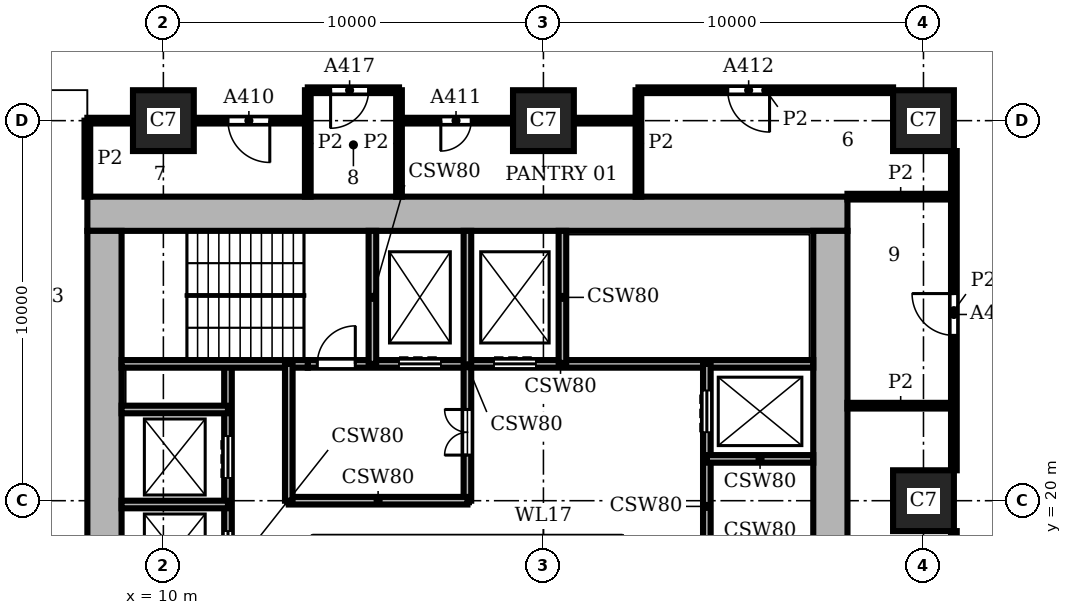
"""IFC4 building model, lengths in metres.
Left out: names, types, materials, properties, quantities, classifications, styles, units other than length and angle.
Written with IfcOpenShell. Run it as: python <this file> out.ifc"""

import sys

from ifc_helpers import new_model, si_unit, direction, frame, frame_2d, origin, origin_2d, place, context, subcontext, project, spatial, rectangle, extrude, element, fill, save


model = new_model("IFC4")
c1 = context("Model", 3, precision=1e-05, world=origin(), true_north=direction((0.0, 1.0)))
c2 = subcontext(c1, "Body", "Model", "MODEL_VIEW")
j1 = project(units=[si_unit("LENGTHUNIT", "METRE"), si_unit("PLANEANGLEUNIT", "RADIAN")], contexts=[c1])
p1 = place(None, origin())
s1 = spatial("IfcSite", under=j1, at=p1, CompositionType="ELEMENT")
p2 = place(p1, origin())
s2 = spatial("IfcBuilding", under=s1, at=p2, CompositionType="ELEMENT")
p3 = place(p2, frame((0.0, 0.0, 47.1)))
s3 = spatial("IfcBuildingStorey", under=s2, at=p3, CompositionType="ELEMENT", Elevation=47.1)
for number, where, z_axis, x_axis in (
    (1, (10.0, 30.0, 0.0), (0.0, 0.0, 1.0), (1.0, 0.0, 0.0)),
    (2, (20.0, 30.0, 0.0), (0.0, 0.0, 1.0), (1.0, 0.0, 0.0)),
    (3, (30.0, 20.0, 0.0), (0.0, 0.0, 1.0), (1.0, 0.0, 0.0)),
    (4, (30.0, 30.0, 0.0), (0.0, 0.0, 1.0), (1.0, 0.0, 0.0)),
):
    element("IfcColumn", number, at=place(p3, frame(where, z_axis=z_axis, x_axis=x_axis)), inside=s3, PredefinedType="COLUMN", context=c2, shape_type="SweptSolid", body=[
        extrude(rectangle(XDim=1.6, YDim=1.6, at=origin_2d()), origin(), (0.0, 0.0, 1.0), 3.9),
    ])
p4 = place(p3, frame((27.55, 8.9, 0.0), z_axis=(0.0, 0.0, 1.0), x_axis=(0.0, 1.0, 0.0)))
e5 = element("IfcWall", 5, at=p4, inside=s3, PredefinedType="SHEAR", context=c2, shape_type="SweptSolid", body=[
    extrude(rectangle(XDim=18.2, YDim=0.9, at=frame_2d((9.1, 0.0))), origin(), (0.0, 0.0, 1.0), 3.9),
])
p5 = place(p4, frame((4.55, 0.0, 0.0)))
e6 = element("IfcOpeningElement", 6, at=p5, cuts=e5, PredefinedType="OPENING", context=c2, shape_type="SweptSolid", body=[
    extrude(rectangle(XDim=1.6, YDim=2.1, at=frame_2d((0.8, 1.05))), frame((0.0, 0.46, 0.0), z_axis=(0.0, -1.0, 0.0), x_axis=(1.0, 0.0, 0.0)), (0.0, 0.0, 1.0), 0.92),
])
p6 = place(p3, frame((28.0, 27.55, 0.0), z_axis=(0.0, 0.0, 1.0), x_axis=(-1.0, 0.0, 0.0)))
e7 = element("IfcWall", 7, at=p6, inside=s3, PredefinedType="SHEAR", context=c2, shape_type="SweptSolid", body=[
    extrude(rectangle(XDim=20.0, YDim=0.9, at=frame_2d((10.0, 0.0))), origin(), (0.0, 0.0, 1.0), 3.9),
])
p7 = place(p3, frame((8.45, 27.1, 0.0), z_axis=(0.0, 0.0, 1.0), x_axis=(0.0, -1.0, 0.0)))
e8 = element("IfcWall", 8, at=p7, inside=s3, PredefinedType="SHEAR", context=c2, shape_type="SweptSolid", body=[
    extrude(rectangle(XDim=18.2, YDim=0.9, at=frame_2d((9.1, 0.0))), origin(), (0.0, 0.0, 1.0), 3.9),
])
p8 = place(p3, frame((8.9, 19.9, 0.0), z_axis=(0.0, 0.0, 1.0), x_axis=(1.0, 0.0, 0.0)))
e9 = element("IfcWall", 9, at=p8, inside=s3, PredefinedType="SHEAR", context=c2, shape_type="SweptSolid", body=[
    extrude(rectangle(XDim=2.8, YDim=0.2, at=frame_2d((1.4, 0.0))), origin(), (0.0, 0.0, 1.0), 3.58),
])
p9 = place(p3, frame((13.3, 20.0, 0.0), z_axis=(0.0, 0.0, 1.0), x_axis=(1.0, 0.0, 0.0)))
e10 = element("IfcWall", 10, at=p9, inside=s3, PredefinedType="SHEAR", context=c2, shape_type="SweptSolid", body=[
    extrude(rectangle(XDim=4.7, YDim=0.2, at=frame_2d((2.35, 0.0))), origin(), (0.0, 0.0, 1.0), 3.58),
])
for number, where, z_axis, x_axis in (
    (11, (24.3, 21.1, 0.0), (0.0, 0.0, 1.0), (1.0, 0.0, 0.0)),
    (12, (8.9, 22.4, 0.0), (0.0, 0.0, 1.0), (1.0, 0.0, 0.0)),
):
    element("IfcWall", number, at=place(p3, frame(where, z_axis=z_axis, x_axis=x_axis)), inside=s3, PredefinedType="SHEAR", context=c2, shape_type="SweptSolid", body=[
        extrude(rectangle(XDim=2.8, YDim=0.2, at=frame_2d((1.4, 0.0))), origin(), (0.0, 0.0, 1.0), 3.58),
    ])
p10 = place(p3, frame((8.9, 23.6, 0.0), z_axis=(0.0, 0.0, 1.0), x_axis=(1.0, 0.0, 0.0)))
e13 = element("IfcWall", 13, at=p10, inside=s3, PredefinedType="SHEAR", context=c2, shape_type="SweptSolid", body=[
    extrude(rectangle(XDim=4.9, YDim=0.2, at=frame_2d((2.45, 0.0))), origin(), (0.0, 0.0, 1.0), 3.58),
])
p11 = place(p3, frame((13.8, 23.6, 0.0), z_axis=(0.0, 0.0, 1.0), x_axis=(1.0, 0.0, 0.0)))
e14 = element("IfcWall", 14, at=p11, inside=s3, PredefinedType="SHEAR", context=c2, shape_type="SweptSolid", body=[
    extrude(rectangle(XDim=13.3, YDim=0.2, at=frame_2d((6.65, 0.0))), origin(), (0.0, 0.0, 1.0), 3.58),
])
p12 = place(p11, frame((2.4, 0.0, 0.0)))
e15 = element("IfcOpeningElement", 15, at=p12, cuts=e14, PredefinedType="OPENING", context=c2, shape_type="SweptSolid", body=[
    extrude(rectangle(XDim=1.1, YDim=2.1, at=frame_2d((0.55, 1.05))), frame((0.0, 0.11, 0.0), z_axis=(0.0, -1.0, 0.0), x_axis=(1.0, 0.0, 0.0)), (0.0, 0.0, 1.0), 0.22),
])
p13 = place(p11, frame((4.9, 0.0, 0.0)))
e16 = element("IfcOpeningElement", 16, at=p13, cuts=e14, PredefinedType="OPENING", context=c2, shape_type="SweptSolid", body=[
    extrude(rectangle(XDim=1.1, YDim=2.1, at=frame_2d((0.55, 1.05))), frame((0.0, 0.11, 0.0), z_axis=(0.0, -1.0, 0.0), x_axis=(1.0, 0.0, 0.0)), (0.0, 0.0, 1.0), 0.22),
])
p14 = place(p11, frame((0.25, 0.0, 0.0)))
e17 = element("IfcOpeningElement", 17, at=p14, cuts=e14, PredefinedType="OPENING", context=c2, shape_type="SweptSolid", body=[
    extrude(rectangle(XDim=1.0, YDim=2.1, at=frame_2d((0.5, 1.05))), frame((0.0, 0.11, 0.0), z_axis=(0.0, -1.0, 0.0), x_axis=(1.0, 0.0, 0.0)), (0.0, 0.0, 1.0), 0.22),
])
p15 = place(p3, frame((11.7, 12.4, 0.0), z_axis=(0.0, 0.0, 1.0), x_axis=(0.0, 1.0, 0.0)))
e18 = element("IfcWall", 18, at=p15, inside=s3, PredefinedType="SHEAR", context=c2, shape_type="SweptSolid", body=[
    extrude(rectangle(XDim=11.2, YDim=0.2, at=frame_2d((5.6, 0.0))), origin(), (0.0, 0.0, 1.0), 3.58),
])
p16 = place(p15, frame((0.7, 0.0, 0.0)))
e19 = element("IfcOpeningElement", 19, at=p16, cuts=e18, PredefinedType="OPENING", context=c2, shape_type="SweptSolid", body=[
    extrude(rectangle(XDim=1.1, YDim=2.1, at=frame_2d((0.55, 1.05))), frame((0.0, 0.11, 0.0), z_axis=(0.0, -1.0, 0.0), x_axis=(1.0, 0.0, 0.0)), (0.0, 0.0, 1.0), 0.22),
])
p17 = place(p15, frame((3.2, 0.0, 0.0)))
e20 = element("IfcOpeningElement", 20, at=p17, cuts=e18, PredefinedType="OPENING", context=c2, shape_type="SweptSolid", body=[
    extrude(rectangle(XDim=1.1, YDim=2.1, at=frame_2d((0.55, 1.05))), frame((0.0, 0.11, 0.0), z_axis=(0.0, -1.0, 0.0), x_axis=(1.0, 0.0, 0.0)), (0.0, 0.0, 1.0), 0.22),
])
p18 = place(p15, frame((5.7, 0.0, 0.0)))
e21 = element("IfcOpeningElement", 21, at=p18, cuts=e18, PredefinedType="OPENING", context=c2, shape_type="SweptSolid", body=[
    extrude(rectangle(XDim=1.1, YDim=2.1, at=frame_2d((0.55, 1.05))), frame((0.0, 0.11, 0.0), z_axis=(0.0, -1.0, 0.0), x_axis=(1.0, 0.0, 0.0)), (0.0, 0.0, 1.0), 0.22),
])
p19 = place(p15, frame((8.2, 0.0, 0.0)))
e22 = element("IfcOpeningElement", 22, at=p19, cuts=e18, PredefinedType="OPENING", context=c2, shape_type="SweptSolid", body=[
    extrude(rectangle(XDim=1.1, YDim=2.1, at=frame_2d((0.55, 1.05))), frame((0.0, 0.11, 0.0), z_axis=(0.0, -1.0, 0.0), x_axis=(1.0, 0.0, 0.0)), (0.0, 0.0, 1.0), 0.22),
])
p20 = place(p3, frame((13.3, 20.0, 0.0), z_axis=(0.0, 0.0, 1.0), x_axis=(0.0, 1.0, 0.0)))
e23 = element("IfcWall", 23, at=p20, inside=s3, PredefinedType="SHEAR", context=c2, shape_type="SweptSolid", body=[
    extrude(rectangle(XDim=3.6, YDim=0.2, at=frame_2d((1.8, 0.0))), origin(), (0.0, 0.0, 1.0), 3.58),
])
p21 = place(p3, frame((15.5, 23.6, 0.0), z_axis=(0.0, 0.0, 1.0), x_axis=(0.0, 1.0, 0.0)))
e24 = element("IfcWall", 24, at=p21, inside=s3, PredefinedType="SHEAR", context=c2, shape_type="SweptSolid", body=[
    extrude(rectangle(XDim=3.5, YDim=0.2, at=frame_2d((1.75, 0.0))), origin(), (0.0, 0.0, 1.0), 3.58),
])
p22 = place(p3, frame((18.0, 20.0, 0.0), z_axis=(0.0, 0.0, 1.0), x_axis=(0.0, 1.0, 0.0)))
e25 = element("IfcWall", 25, at=p22, inside=s3, PredefinedType="SHEAR", context=c2, shape_type="SweptSolid", body=[
    extrude(rectangle(XDim=7.1, YDim=0.2, at=frame_2d((3.55, 0.0))), origin(), (0.0, 0.0, 1.0), 3.58),
])
p23 = place(p22, frame((1.2, 0.0, 0.0)))
e26 = element("IfcOpeningElement", 26, at=p23, cuts=e25, PredefinedType="OPENING", context=c2, shape_type="SweptSolid", body=[
    extrude(rectangle(XDim=1.2, YDim=2.1, at=frame_2d((0.6, 1.05))), frame((0.0, 0.11, 0.0), z_axis=(0.0, -1.0, 0.0), x_axis=(1.0, 0.0, 0.0)), (0.0, 0.0, 1.0), 0.22),
])
p24 = place(p3, frame((20.5, 23.6, 0.0), z_axis=(0.0, 0.0, 1.0), x_axis=(0.0, 1.0, 0.0)))
e27 = element("IfcWall", 27, at=p24, inside=s3, PredefinedType="SHEAR", context=c2, shape_type="SweptSolid", body=[
    extrude(rectangle(XDim=3.5, YDim=0.2, at=frame_2d((1.75, 0.0))), origin(), (0.0, 0.0, 1.0), 3.58),
])
p25 = place(p3, frame((24.3, 16.1, 0.0), z_axis=(0.0, 0.0, 1.0), x_axis=(0.0, 1.0, 0.0)))
e28 = element("IfcWall", 28, at=p25, inside=s3, PredefinedType="SHEAR", context=c2, shape_type="SweptSolid", body=[
    extrude(rectangle(XDim=7.5, YDim=0.2, at=frame_2d((3.75, 0.0))), origin(), (0.0, 0.0, 1.0), 3.58),
])
p26 = place(p25, frame((5.7, 0.0, 0.0)))
e29 = element("IfcOpeningElement", 29, at=p26, cuts=e28, PredefinedType="OPENING", context=c2, shape_type="SweptSolid", body=[
    extrude(rectangle(XDim=1.1, YDim=2.1, at=frame_2d((0.55, 1.05))), frame((0.0, 0.11, 0.0), z_axis=(0.0, -1.0, 0.0), x_axis=(1.0, 0.0, 0.0)), (0.0, 0.0, 1.0), 0.22),
])
p27 = place(p3, frame((8.0, 28.0, 0.0), z_axis=(0.0, 0.0, 1.0), x_axis=(0.0, 1.0, 0.0)))
e30 = element("IfcWall", 30, at=p27, inside=s3, PredefinedType="PARTITIONING", context=c2, shape_type="SweptSolid", body=[
    extrude(rectangle(XDim=2.0, YDim=0.15, at=frame_2d((1.0, 0.0))), origin(), (0.0, 0.0, 1.0), 3.58),
])
for number, where, z_axis, x_axis in (
    (31, (13.8, 28.0, 0.0), (0.0, 0.0, 1.0), (0.0, 1.0, 0.0)),
    (32, (16.2, 28.0, 0.0), (0.0, 0.0, 1.0), (0.0, 1.0, 0.0)),
    (33, (22.5, 28.0, 0.0), (0.0, 0.0, 1.0), (0.0, 1.0, 0.0)),
):
    element("IfcWall", number, at=place(p3, frame(where, z_axis=z_axis, x_axis=x_axis)), inside=s3, PredefinedType="PARTITIONING", context=c2, shape_type="SweptSolid", body=[
        extrude(rectangle(XDim=2.8, YDim=0.15, at=frame_2d((1.4, 0.0))), origin(), (0.0, 0.0, 1.0), 3.58),
    ])
p28 = place(p3, frame((30.8, 15.45, 0.0), z_axis=(0.0, 0.0, 1.0), x_axis=(0.0, 1.0, 0.0)))
e34 = element("IfcWall", 34, at=p28, inside=s3, PredefinedType="PARTITIONING", context=c2, shape_type="SweptSolid", body=[
    extrude(rectangle(XDim=3.75, YDim=0.15, at=frame_2d((1.875, 0.0))), origin(), (0.0, 0.0, 1.0), 3.58),
])
p29 = place(p28, frame((1.35, 0.0, 0.0)))
e35 = element("IfcOpeningElement", 35, at=p29, cuts=e34, PredefinedType="OPENING", context=c2, shape_type="SweptSolid", body=[
    extrude(rectangle(XDim=0.8, YDim=2.1, at=frame_2d((0.4, 1.05))), frame((0.0, 0.085, 0.0), z_axis=(0.0, -1.0, 0.0), x_axis=(1.0, 0.0, 0.0)), (0.0, 0.0, 1.0), 0.17),
])
p30 = place(p3, frame((30.8, 20.8, 0.0), z_axis=(0.0, 0.0, 1.0), x_axis=(0.0, 1.0, 0.0)))
e36 = element("IfcWall", 36, at=p30, inside=s3, PredefinedType="PARTITIONING", context=c2, shape_type="SweptSolid", body=[
    extrude(rectangle(XDim=8.4, YDim=0.15, at=frame_2d((4.2, 0.0))), origin(), (0.0, 0.0, 1.0), 3.58),
])
p31 = place(p30, frame((3.55, 0.0, 0.0)))
e37 = element("IfcOpeningElement", 37, at=p31, cuts=e36, PredefinedType="OPENING", context=c2, shape_type="SweptSolid", body=[
    extrude(rectangle(XDim=1.1, YDim=2.1, at=frame_2d((0.55, 1.05))), frame((0.0, 0.085, 0.0), z_axis=(0.0, -1.0, 0.0), x_axis=(1.0, 0.0, 0.0)), (0.0, 0.0, 1.0), 0.17),
])
for number, where, z_axis, x_axis in (
    (38, (28.0, 22.5, 0.0), (0.0, 0.0, 1.0), (1.0, 0.0, 0.0)),
    (39, (28.0, 28.0, 0.0), (0.0, 0.0, 1.0), (1.0, 0.0, 0.0)),
):
    element("IfcWall", number, at=place(p3, frame(where, z_axis=z_axis, x_axis=x_axis)), inside=s3, PredefinedType="PARTITIONING", context=c2, shape_type="SweptSolid", body=[
        extrude(rectangle(XDim=2.8, YDim=0.15, at=frame_2d((1.4, 0.0))), origin(), (0.0, 0.0, 1.0), 3.58),
    ])
p32 = place(p3, frame((8.0, 30.0, 0.0), z_axis=(0.0, 0.0, 1.0), x_axis=(1.0, 0.0, 0.0)))
e40 = element("IfcWall", 40, at=p32, inside=s3, PredefinedType="PARTITIONING", context=c2, shape_type="SweptSolid", body=[
    extrude(rectangle(XDim=1.2, YDim=0.15, at=frame_2d((0.6, 0.0))), origin(), (0.0, 0.0, 1.0), 3.58),
])
p33 = place(p3, frame((10.8, 30.0, 0.0), z_axis=(0.0, 0.0, 1.0), x_axis=(1.0, 0.0, 0.0)))
e41 = element("IfcWall", 41, at=p33, inside=s3, PredefinedType="PARTITIONING", context=c2, shape_type="SweptSolid", body=[
    extrude(rectangle(XDim=3.0, YDim=0.15, at=frame_2d((1.5, 0.0))), origin(), (0.0, 0.0, 1.0), 3.58),
])
p34 = place(p33, frame((0.9, 0.0, 0.0)))
e42 = element("IfcOpeningElement", 42, at=p34, cuts=e41, PredefinedType="OPENING", context=c2, shape_type="SweptSolid", body=[
    extrude(rectangle(XDim=1.1, YDim=2.1, at=frame_2d((0.55, 1.05))), frame((0.0, 0.085, 0.0), z_axis=(0.0, -1.0, 0.0), x_axis=(1.0, 0.0, 0.0)), (0.0, 0.0, 1.0), 0.17),
])
p35 = place(p3, frame((16.2, 30.0, 0.0), z_axis=(0.0, 0.0, 1.0), x_axis=(1.0, 0.0, 0.0)))
e43 = element("IfcWall", 43, at=p35, inside=s3, PredefinedType="PARTITIONING", context=c2, shape_type="SweptSolid", body=[
    extrude(rectangle(XDim=3.0, YDim=0.15, at=frame_2d((1.5, 0.0))), origin(), (0.0, 0.0, 1.0), 3.58),
])
p36 = place(p35, frame((1.1, 0.0, 0.0)))
e44 = element("IfcOpeningElement", 44, at=p36, cuts=e43, PredefinedType="OPENING", context=c2, shape_type="SweptSolid", body=[
    extrude(rectangle(XDim=0.8, YDim=2.1, at=frame_2d((0.4, 1.05))), frame((0.0, 0.085, 0.0), z_axis=(0.0, -1.0, 0.0), x_axis=(1.0, 0.0, 0.0)), (0.0, 0.0, 1.0), 0.17),
])
p37 = place(p3, frame((20.8, 30.0, 0.0), z_axis=(0.0, 0.0, 1.0), x_axis=(1.0, 0.0, 0.0)))
e45 = element("IfcWall", 45, at=p37, inside=s3, PredefinedType="PARTITIONING", context=c2, shape_type="SweptSolid", body=[
    extrude(rectangle(XDim=1.7, YDim=0.15, at=frame_2d((0.85, 0.0))), origin(), (0.0, 0.0, 1.0), 3.58),
])
p38 = place(p3, frame((13.8, 30.8, 0.0), z_axis=(0.0, 0.0, 1.0), x_axis=(1.0, 0.0, 0.0)))
e46 = element("IfcWall", 46, at=p38, inside=s3, PredefinedType="PARTITIONING", context=c2, shape_type="SweptSolid", body=[
    extrude(rectangle(XDim=2.4, YDim=0.15, at=frame_2d((1.2, 0.0))), origin(), (0.0, 0.0, 1.0), 3.58),
])
p39 = place(p38, frame((0.6, 0.0, 0.0)))
e47 = element("IfcOpeningElement", 47, at=p39, cuts=e46, PredefinedType="OPENING", context=c2, shape_type="SweptSolid", body=[
    extrude(rectangle(XDim=1.0, YDim=2.1, at=frame_2d((0.5, 1.05))), frame((0.0, 0.085, 0.0), z_axis=(0.0, -1.0, 0.0), x_axis=(1.0, 0.0, 0.0)), (0.0, 0.0, 1.0), 0.17),
])
p40 = place(p3, frame((22.5, 30.8, 0.0), z_axis=(0.0, 0.0, 1.0), x_axis=(1.0, 0.0, 0.0)))
e48 = element("IfcWall", 48, at=p40, inside=s3, PredefinedType="PARTITIONING", context=c2, shape_type="SweptSolid", body=[
    extrude(rectangle(XDim=6.7, YDim=0.15, at=frame_2d((3.35, 0.0))), origin(), (0.0, 0.0, 1.0), 3.58),
])
p41 = place(p40, frame((2.35, 0.0, 0.0)))
e49 = element("IfcOpeningElement", 49, at=p41, cuts=e48, PredefinedType="OPENING", context=c2, shape_type="SweptSolid", body=[
    extrude(rectangle(XDim=1.1, YDim=2.1, at=frame_2d((0.55, 1.05))), frame((0.0, 0.085, 0.0), z_axis=(0.0, -1.0, 0.0), x_axis=(1.0, 0.0, 0.0)), (0.0, 0.0, 1.0), 0.17),
])
p42 = place(p18, origin())
e50 = element("IfcDoor", 50, at=p42, inside=s3, OperationType="DOUBLE_DOOR_SLIDING", PredefinedType="DOOR", context=c2, shape_type="SweptSolid", body=[
    extrude(rectangle(XDim=1.1, YDim=2.1, at=frame_2d((0.55, 1.05))), frame((0.0, 0.025, 0.0), z_axis=(0.0, -1.0, 0.0), x_axis=(1.0, 0.0, 0.0)), (0.0, 0.0, 1.0), 0.05),
])
fill(e21, e50)
p43 = place(p19, origin())
e51 = element("IfcDoor", 51, at=p43, inside=s3, OperationType="DOUBLE_DOOR_SLIDING", PredefinedType="DOOR", context=c2, shape_type="SweptSolid", body=[
    extrude(rectangle(XDim=1.1, YDim=2.1, at=frame_2d((0.55, 1.05))), frame((0.0, 0.025, 0.0), z_axis=(0.0, -1.0, 0.0), x_axis=(1.0, 0.0, 0.0)), (0.0, 0.0, 1.0), 0.05),
])
fill(e22, e51)
p44 = place(p26, origin())
e52 = element("IfcDoor", 52, at=p44, inside=s3, OperationType="DOUBLE_DOOR_SLIDING", PredefinedType="DOOR", context=c2, shape_type="SweptSolid", body=[
    extrude(rectangle(XDim=1.1, YDim=2.1, at=frame_2d((0.55, 1.05))), frame((0.0, 0.025, 0.0), z_axis=(0.0, -1.0, 0.0), x_axis=(1.0, 0.0, 0.0)), (0.0, 0.0, 1.0), 0.05),
])
fill(e29, e52)
p45 = place(p12, origin())
e53 = element("IfcDoor", 53, at=p45, inside=s3, OperationType="DOUBLE_DOOR_SLIDING", PredefinedType="DOOR", context=c2, shape_type="SweptSolid", body=[
    extrude(rectangle(XDim=1.1, YDim=2.1, at=frame_2d((0.55, 1.05))), frame((0.0, 0.025, 0.0), z_axis=(0.0, -1.0, 0.0), x_axis=(1.0, 0.0, 0.0)), (0.0, 0.0, 1.0), 0.05),
])
fill(e15, e53)
p46 = place(p13, origin())
e54 = element("IfcDoor", 54, at=p46, inside=s3, OperationType="DOUBLE_DOOR_SLIDING", PredefinedType="DOOR", context=c2, shape_type="SweptSolid", body=[
    extrude(rectangle(XDim=1.1, YDim=2.1, at=frame_2d((0.55, 1.05))), frame((0.0, 0.025, 0.0), z_axis=(0.0, -1.0, 0.0), x_axis=(1.0, 0.0, 0.0)), (0.0, 0.0, 1.0), 0.05),
])
fill(e16, e54)
p47 = place(p14, origin())
e55 = element("IfcDoor", 55, at=p47, inside=s3, OperationType="SINGLE_SWING_RIGHT", PredefinedType="DOOR", context=c2, shape_type="SweptSolid", body=[
    extrude(rectangle(XDim=1.0, YDim=2.1, at=frame_2d((0.5, 1.05))), frame((0.0, 0.025, 0.0), z_axis=(0.0, -1.0, 0.0), x_axis=(1.0, 0.0, 0.0)), (0.0, 0.0, 1.0), 0.05),
])
fill(e17, e55)
p48 = place(p23, origin())
e56 = element("IfcDoor", 56, at=p48, inside=s3, OperationType="DOUBLE_DOOR_SINGLE_SWING", PredefinedType="DOOR", context=c2, shape_type="SweptSolid", body=[
    extrude(rectangle(XDim=1.2, YDim=2.1, at=frame_2d((0.6, 1.05))), frame((0.0, 0.025, 0.0), z_axis=(0.0, -1.0, 0.0), x_axis=(1.0, 0.0, 0.0)), (0.0, 0.0, 1.0), 0.05),
])
fill(e26, e56)
p49 = place(p31, origin())
e57 = element("IfcDoor", 57, at=p49, inside=s3, OperationType="SINGLE_SWING_RIGHT", PredefinedType="DOOR", context=c2, shape_type="SweptSolid", body=[
    extrude(rectangle(XDim=1.1, YDim=2.1, at=frame_2d((0.55, 1.05))), frame((0.0, 0.025, 0.0), z_axis=(0.0, -1.0, 0.0), x_axis=(1.0, 0.0, 0.0)), (0.0, 0.0, 1.0), 0.05),
])
fill(e37, e57)
p50 = place(p34, frame((1.1, 0.0, 0.0), z_axis=(0.0, 0.0, 1.0), x_axis=(-1.0, 0.0, 0.0)))
e58 = element("IfcDoor", 58, at=p50, inside=s3, OperationType="SINGLE_SWING_LEFT", PredefinedType="DOOR", context=c2, shape_type="SweptSolid", body=[
    extrude(rectangle(XDim=1.1, YDim=2.1, at=frame_2d((0.55, 1.05))), frame((0.0, 0.025, 0.0), z_axis=(0.0, -1.0, 0.0), x_axis=(1.0, 0.0, 0.0)), (0.0, 0.0, 1.0), 0.05),
])
fill(e42, e58)
p51 = place(p36, frame((0.8, 0.0, 0.0), z_axis=(0.0, 0.0, 1.0), x_axis=(-1.0, 0.0, 0.0)))
e59 = element("IfcDoor", 59, at=p51, inside=s3, OperationType="SINGLE_SWING_RIGHT", PredefinedType="DOOR", context=c2, shape_type="SweptSolid", body=[
    extrude(rectangle(XDim=0.8, YDim=2.1, at=frame_2d((0.4, 1.05))), frame((0.0, 0.025, 0.0), z_axis=(0.0, -1.0, 0.0), x_axis=(1.0, 0.0, 0.0)), (0.0, 0.0, 1.0), 0.05),
])
fill(e44, e59)
p52 = place(p41, frame((1.1, 0.0, 0.0), z_axis=(0.0, 0.0, 1.0), x_axis=(-1.0, 0.0, 0.0)))
e60 = element("IfcDoor", 60, at=p52, inside=s3, OperationType="SINGLE_SWING_LEFT", PredefinedType="DOOR", context=c2, shape_type="SweptSolid", body=[
    extrude(rectangle(XDim=1.1, YDim=2.1, at=frame_2d((0.55, 1.05))), frame((0.0, 0.025, 0.0), z_axis=(0.0, -1.0, 0.0), x_axis=(1.0, 0.0, 0.0)), (0.0, 0.0, 1.0), 0.05),
])
fill(e49, e60)
p53 = place(p39, frame((1.0, 0.0, 0.0), z_axis=(0.0, 0.0, 1.0), x_axis=(-1.0, 0.0, 0.0)))
e61 = element("IfcDoor", 61, at=p53, inside=s3, OperationType="SINGLE_SWING_RIGHT", PredefinedType="DOOR", context=c2, shape_type="SweptSolid", body=[
    extrude(rectangle(XDim=1.0, YDim=2.1, at=frame_2d((0.5, 1.05))), frame((0.0, 0.025, 0.0), z_axis=(0.0, -1.0, 0.0), x_axis=(1.0, 0.0, 0.0)), (0.0, 0.0, 1.0), 0.05),
])
fill(e47, e61)
save(model, sys.argv[1])
